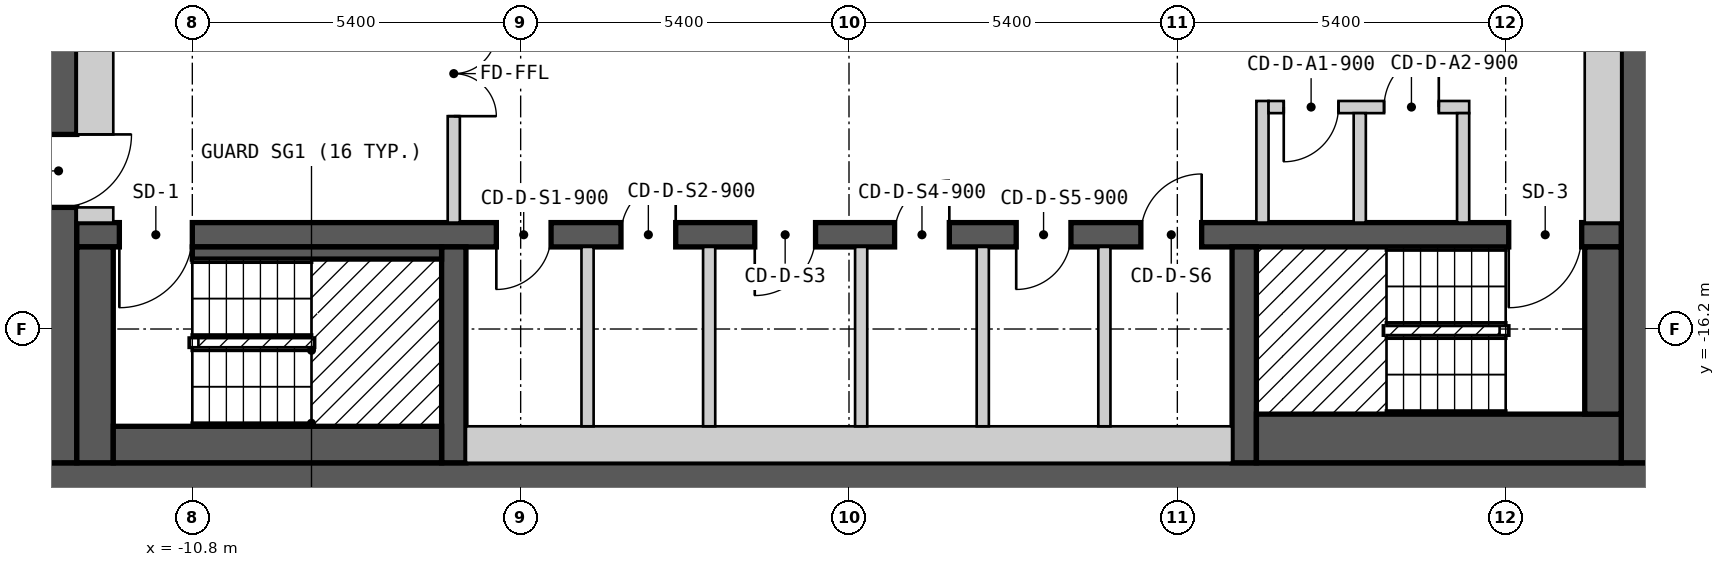
"""IFC4 building model, lengths in metres.
Left out: names, types, materials, properties, quantities, classifications, styles, units other than length and angle.
Written with IfcOpenShell. Run it as: python <this file> out.ifc"""

import sys

from ifc_helpers import new_model, si_unit, direction, frame, frame_2d, origin, place, context, subcontext, project, spatial, rectangle, extrude, element, fill, save


model = new_model("IFC4")
c1 = context("Model", 3, precision=1e-05, world=origin(), true_north=direction((0.0, 1.0)))
c2 = subcontext(c1, "Body", "Model", "MODEL_VIEW")
j1 = project(units=[si_unit("LENGTHUNIT", "METRE"), si_unit("PLANEANGLEUNIT", "RADIAN")], contexts=[c1])
p1 = place(None, origin())
s1 = spatial("IfcSite", under=j1, at=p1, CompositionType="ELEMENT")
p2 = place(p1, origin())
s2 = spatial("IfcBuilding", under=s1, at=p2, CompositionType="ELEMENT")
p3 = place(p2, frame((0.0, 0.0, 169.2)))
s3 = spatial("IfcBuildingStorey", under=s2, at=p3, CompositionType="ELEMENT", Elevation=169.2)
p4 = place(p3, frame((-13.3, -18.7, 0.0), z_axis=(0.0, 0.0, 1.0), x_axis=(1.0, 0.0, 0.0)))
e1 = element("IfcWall", 1, at=p4, inside=s3, PredefinedType="SHEAR", context=c2, shape_type="SweptSolid", body=[
    extrude(rectangle(XDim=26.6, YDim=0.6, at=frame_2d((13.3, 0.0))), origin(), (0.0, 0.0, 1.0), 2.7),
])
p5 = place(p3, frame((-13.0, -18.4, 0.0), z_axis=(0.0, 0.0, 1.0), x_axis=(0.0, 1.0, 0.0)))
e2 = element("IfcWall", 2, at=p5, inside=s3, PredefinedType="SHEAR", context=c2, shape_type="SweptSolid", body=[
    extrude(rectangle(XDim=12.8, YDim=0.6, at=frame_2d((6.4, 0.0))), origin(), (0.0, 0.0, 1.0), 2.7),
])
p6 = place(p5, frame((4.2, 0.0, 0.0)))
e3 = element("IfcOpeningElement", 3, at=p6, cuts=e2, PredefinedType="OPENING", context=c2, shape_type="SweptSolid", body=[
    extrude(rectangle(XDim=1.2, YDim=2.1, at=frame_2d((0.6, 1.05))), frame((0.0, 0.31, 0.0), z_axis=(0.0, -1.0, 0.0), x_axis=(1.0, 0.0, 0.0)), (0.0, 0.0, 1.0), 0.62),
])
p7 = place(p3, frame((13.0, -18.4, 0.0), z_axis=(0.0, 0.0, 1.0), x_axis=(0.0, 1.0, 0.0)))
e4 = element("IfcWall", 4, at=p7, inside=s3, PredefinedType="SHEAR", context=c2, shape_type="SweptSolid", body=[
    extrude(rectangle(XDim=12.8, YDim=0.6, at=frame_2d((6.4, 0.0))), origin(), (0.0, 0.0, 1.0), 2.7),
])
p8 = place(p3, frame((-12.7, -14.65, 0.0), z_axis=(0.0, 0.0, 1.0), x_axis=(1.0, 0.0, 0.0)))
e5 = element("IfcWall", 5, at=p8, inside=s3, PredefinedType="SHEAR", context=c2, shape_type="SweptSolid", body=[
    extrude(rectangle(XDim=25.4, YDim=0.4, at=frame_2d((12.7, 0.0))), origin(), (0.0, 0.0, 1.0), 2.7),
])
p9 = place(p8, frame((1.9, 0.0, 0.0), z_axis=(0.0, 0.0, 1.0), x_axis=(-1.0, 0.0, 0.0)))
e6 = element("IfcOpeningElement", 6, at=p9, cuts=e5, PredefinedType="OPENING", context=c2, shape_type="SweptSolid", body=[
    extrude(rectangle(XDim=1.2, YDim=2.1, at=frame_2d((0.6, 1.05))), frame((0.0, 0.21, 0.0), z_axis=(0.0, -1.0, 0.0), x_axis=(1.0, 0.0, 0.0)), (0.0, 0.0, 1.0), 0.42),
])
p10 = place(p8, frame((24.75, 0.0, 0.0), z_axis=(0.0, 0.0, 1.0), x_axis=(-1.0, 0.0, 0.0)))
e7 = element("IfcOpeningElement", 7, at=p10, cuts=e5, PredefinedType="OPENING", context=c2, shape_type="SweptSolid", body=[
    extrude(rectangle(XDim=1.2, YDim=2.1, at=frame_2d((0.6, 1.05))), frame((0.0, 0.21, 0.0), z_axis=(0.0, -1.0, 0.0), x_axis=(1.0, 0.0, 0.0)), (0.0, 0.0, 1.0), 0.42),
])
p11 = place(p8, frame((7.8, 0.0, 0.0), z_axis=(0.0, 0.0, 1.0), x_axis=(-1.0, 0.0, 0.0)))
e8 = element("IfcOpeningElement", 8, at=p11, cuts=e5, PredefinedType="OPENING", context=c2, shape_type="SweptSolid", body=[
    extrude(rectangle(XDim=0.9, YDim=2.1, at=frame_2d((0.45, 1.05))), frame((0.0, 0.21, 0.0), z_axis=(0.0, -1.0, 0.0), x_axis=(1.0, 0.0, 0.0)), (0.0, 0.0, 1.0), 0.42),
])
p12 = place(p8, frame((9.85, 0.0, 0.0), z_axis=(0.0, 0.0, 1.0), x_axis=(-1.0, 0.0, 0.0)))
e9 = element("IfcOpeningElement", 9, at=p12, cuts=e5, PredefinedType="OPENING", context=c2, shape_type="SweptSolid", body=[
    extrude(rectangle(XDim=0.9, YDim=2.1, at=frame_2d((0.45, 1.05))), frame((0.0, 0.21, 0.0), z_axis=(0.0, -1.0, 0.0), x_axis=(1.0, 0.0, 0.0)), (0.0, 0.0, 1.0), 0.42),
])
p13 = place(p8, frame((12.15, 0.0, 0.0), z_axis=(0.0, 0.0, 1.0), x_axis=(-1.0, 0.0, 0.0)))
e10 = element("IfcOpeningElement", 10, at=p13, cuts=e5, PredefinedType="OPENING", context=c2, shape_type="SweptSolid", body=[
    extrude(rectangle(XDim=1.0, YDim=2.1, at=frame_2d((0.5, 1.05))), frame((0.0, 0.21, 0.0), z_axis=(0.0, -1.0, 0.0), x_axis=(1.0, 0.0, 0.0)), (0.0, 0.0, 1.0), 0.42),
])
p14 = place(p8, frame((14.35, 0.0, 0.0), z_axis=(0.0, 0.0, 1.0), x_axis=(-1.0, 0.0, 0.0)))
e11 = element("IfcOpeningElement", 11, at=p14, cuts=e5, PredefinedType="OPENING", context=c2, shape_type="SweptSolid", body=[
    extrude(rectangle(XDim=0.9, YDim=2.1, at=frame_2d((0.45, 1.05))), frame((0.0, 0.21, 0.0), z_axis=(0.0, -1.0, 0.0), x_axis=(1.0, 0.0, 0.0)), (0.0, 0.0, 1.0), 0.42),
])
p15 = place(p8, frame((16.35, 0.0, 0.0), z_axis=(0.0, 0.0, 1.0), x_axis=(-1.0, 0.0, 0.0)))
e12 = element("IfcOpeningElement", 12, at=p15, cuts=e5, PredefinedType="OPENING", context=c2, shape_type="SweptSolid", body=[
    extrude(rectangle(XDim=0.9, YDim=2.1, at=frame_2d((0.45, 1.05))), frame((0.0, 0.21, 0.0), z_axis=(0.0, -1.0, 0.0), x_axis=(1.0, 0.0, 0.0)), (0.0, 0.0, 1.0), 0.42),
])
p16 = place(p8, frame((18.5, 0.0, 0.0), z_axis=(0.0, 0.0, 1.0), x_axis=(-1.0, 0.0, 0.0)))
e13 = element("IfcOpeningElement", 13, at=p16, cuts=e5, PredefinedType="OPENING", context=c2, shape_type="SweptSolid", body=[
    extrude(rectangle(XDim=1.0, YDim=2.1, at=frame_2d((0.5, 1.05))), frame((0.0, 0.21, 0.0), z_axis=(0.0, -1.0, 0.0), x_axis=(1.0, 0.0, 0.0)), (0.0, 0.0, 1.0), 0.42),
])
for number, where, z_axis, x_axis in (
    (14, (-6.5, -18.4, 0.0), (0.0, 0.0, 1.0), (0.0, 1.0, 0.0)),
    (15, (6.5, -18.4, 0.0), (0.0, 0.0, 1.0), (0.0, 1.0, 0.0)),
):
    element("IfcWall", number, at=place(p3, frame(where, z_axis=z_axis, x_axis=x_axis)), inside=s3, PredefinedType="SHEAR", context=c2, shape_type="SweptSolid", body=[
        extrude(rectangle(XDim=3.55, YDim=0.4, at=frame_2d((1.775, 0.0))), origin(), (0.0, 0.0, 1.0), 2.7),
    ])
p17 = place(p3, frame((-12.4, -18.4, 0.0), z_axis=(0.0, 0.0, 1.0), x_axis=(0.0, 1.0, 0.0)))
e16 = element("IfcWall", 16, at=p17, inside=s3, PredefinedType="SOLIDWALL", context=c2, shape_type="SweptSolid", body=[
    extrude(rectangle(XDim=3.55, YDim=0.6, at=frame_2d((1.775, 0.0))), origin(), (0.0, 0.0, 1.0), 2.7),
])
p18 = place(p3, frame((-12.7, -14.325, 0.0), z_axis=(0.0, 0.0, 1.0), x_axis=(1.0, 0.0, 0.0)))
e17 = element("IfcWall", 17, at=p18, inside=s3, PredefinedType="PARTITIONING", context=c2, shape_type="SweptSolid", body=[
    extrude(rectangle(XDim=0.6, YDim=0.25, at=frame_2d((0.3, 0.0))), origin(), (0.0, 0.0, 1.0), 2.7),
])
p19 = place(p3, frame((-12.4, -13.0, 0.0), z_axis=(0.0, 0.0, 1.0), x_axis=(0.0, 1.0, 0.0)))
e18 = element("IfcWall", 18, at=p19, inside=s3, PredefinedType="PARTITIONING", context=c2, shape_type="SweptSolid", body=[
    extrude(rectangle(XDim=3.45, YDim=0.6, at=frame_2d((1.725, 0.0))), origin(), (0.0, 0.0, 1.0), 2.7),
])
p20 = place(p3, frame((-12.1, -18.1, 0.0), z_axis=(0.0, 0.0, 1.0), x_axis=(1.0, 0.0, 0.0)))
e19 = element("IfcWall", 19, at=p20, inside=s3, PredefinedType="SOLIDWALL", context=c2, shape_type="SweptSolid", body=[
    extrude(rectangle(XDim=5.4, YDim=0.6, at=frame_2d((2.7, 0.0))), origin(), (0.0, 0.0, 1.0), 2.7),
])
p21 = place(p3, frame((-10.8, -14.95, 0.0), z_axis=(0.0, 0.0, 1.0), x_axis=(1.0, 0.0, 0.0)))
e20 = element("IfcWall", 20, at=p21, inside=s3, PredefinedType="SOLIDWALL", context=c2, shape_type="SweptSolid", body=[
    extrude(rectangle(XDim=4.1, YDim=0.2, at=frame_2d((2.05, 0.0))), origin(), (0.0, 0.0, 1.0), 2.7),
])
p22 = place(p3, frame((-6.5, -14.45, 0.0), z_axis=(0.0, 0.0, 1.0), x_axis=(0.0, 1.0, 0.0)))
e21 = element("IfcWall", 21, at=p22, inside=s3, PredefinedType="PARTITIONING", context=c2, shape_type="SweptSolid", body=[
    extrude(rectangle(XDim=4.9, YDim=0.2, at=frame_2d((2.45, 0.0))), origin(), (0.0, 0.0, 1.0), 2.7),
])
p23 = place(p22, frame((3.15, 0.0, 0.0), z_axis=(0.0, 0.0, 1.0), x_axis=(-1.0, 0.0, 0.0)))
e22 = element("IfcOpeningElement", 22, at=p23, cuts=e21, PredefinedType="OPENING", context=c2, shape_type="SweptSolid", body=[
    extrude(rectangle(XDim=1.4, YDim=2.1, at=frame_2d((0.7, 1.05))), frame((0.0, 0.11, 0.0), z_axis=(0.0, -1.0, 0.0), x_axis=(1.0, 0.0, 0.0)), (0.0, 0.0, 1.0), 0.22),
])
p24 = place(p3, frame((-6.3, -18.1, 0.0), z_axis=(0.0, 0.0, 1.0), x_axis=(1.0, 0.0, 0.0)))
e23 = element("IfcWall", 23, at=p24, inside=s3, PredefinedType="PARTITIONING", context=c2, shape_type="SweptSolid", body=[
    extrude(rectangle(XDim=12.6, YDim=0.6, at=frame_2d((6.3, 0.0))), origin(), (0.0, 0.0, 1.0), 2.7),
])
for number, where, z_axis, x_axis in (
    (24, (-4.3, -17.8, 0.0), (0.0, 0.0, 1.0), (0.0, 1.0, 0.0)),
    (25, (-2.3, -17.8, 0.0), (0.0, 0.0, 1.0), (0.0, 1.0, 0.0)),
    (26, (0.2, -17.8, 0.0), (0.0, 0.0, 1.0), (0.0, 1.0, 0.0)),
    (27, (2.2, -17.8, 0.0), (0.0, 0.0, 1.0), (0.0, 1.0, 0.0)),
    (28, (4.2, -17.8, 0.0), (0.0, 0.0, 1.0), (0.0, 1.0, 0.0)),
):
    element("IfcWall", number, at=place(p3, frame(where, z_axis=z_axis, x_axis=x_axis)), inside=s3, PredefinedType="PARTITIONING", context=c2, shape_type="SweptSolid", body=[
        extrude(rectangle(XDim=2.95, YDim=0.2, at=frame_2d((1.475, 0.0))), origin(), (0.0, 0.0, 1.0), 2.7),
    ])
p25 = place(p3, frame((6.7, -18.0, 0.0), z_axis=(0.0, 0.0, 1.0), x_axis=(1.0, 0.0, 0.0)))
e29 = element("IfcWall", 29, at=p25, inside=s3, PredefinedType="SOLIDWALL", context=c2, shape_type="SweptSolid", body=[
    extrude(rectangle(XDim=6.0, YDim=0.8, at=frame_2d((3.0, 0.0))), origin(), (0.0, 0.0, 1.0), 2.7),
])
p26 = place(p3, frame((6.8, -14.45, 0.0), z_axis=(0.0, 0.0, 1.0), x_axis=(0.0, 1.0, 0.0)))
e30 = element("IfcWall", 30, at=p26, inside=s3, PredefinedType="PARTITIONING", context=c2, shape_type="SweptSolid", body=[
    extrude(rectangle(XDim=2.0, YDim=0.2, at=frame_2d((1.0, 0.0))), origin(), (0.0, 0.0, 1.0), 2.7),
])
p27 = place(p3, frame((6.9, -12.55, 0.0), z_axis=(0.0, 0.0, 1.0), x_axis=(1.0, 0.0, 0.0)))
e31 = element("IfcWall", 31, at=p27, inside=s3, PredefinedType="PARTITIONING", context=c2, shape_type="SweptSolid", body=[
    extrude(rectangle(XDim=3.3, YDim=0.2, at=frame_2d((1.65, 0.0))), origin(), (0.0, 0.0, 1.0), 2.7),
])
p28 = place(p27, frame((1.15, 0.0, 0.0), z_axis=(0.0, 0.0, 1.0), x_axis=(-1.0, 0.0, 0.0)))
e32 = element("IfcOpeningElement", 32, at=p28, cuts=e31, PredefinedType="OPENING", context=c2, shape_type="SweptSolid", body=[
    extrude(rectangle(XDim=0.9, YDim=2.1, at=frame_2d((0.45, 1.05))), frame((0.0, 0.11, 0.0), z_axis=(0.0, -1.0, 0.0), x_axis=(1.0, 0.0, 0.0)), (0.0, 0.0, 1.0), 0.22),
])
p29 = place(p27, frame((2.8, 0.0, 0.0), z_axis=(0.0, 0.0, 1.0), x_axis=(-1.0, 0.0, 0.0)))
e33 = element("IfcOpeningElement", 33, at=p29, cuts=e31, PredefinedType="OPENING", context=c2, shape_type="SweptSolid", body=[
    extrude(rectangle(XDim=0.9, YDim=2.1, at=frame_2d((0.45, 1.05))), frame((0.0, 0.11, 0.0), z_axis=(0.0, -1.0, 0.0), x_axis=(1.0, 0.0, 0.0)), (0.0, 0.0, 1.0), 0.22),
])
for number, where, z_axis, x_axis in (
    (34, (8.4, -14.45, 0.0), (0.0, 0.0, 1.0), (0.0, 1.0, 0.0)),
    (35, (10.1, -14.45, 0.0), (0.0, 0.0, 1.0), (0.0, 1.0, 0.0)),
):
    element("IfcWall", number, at=place(p3, frame(where, z_axis=z_axis, x_axis=x_axis)), inside=s3, PredefinedType="PARTITIONING", context=c2, shape_type="SweptSolid", body=[
        extrude(rectangle(XDim=1.8, YDim=0.2, at=frame_2d((0.9, 0.0))), origin(), (0.0, 0.0, 1.0), 2.7),
    ])
p30 = place(p3, frame((12.4, -17.6, 0.0), z_axis=(0.0, 0.0, 1.0), x_axis=(0.0, 1.0, 0.0)))
e36 = element("IfcWall", 36, at=p30, inside=s3, PredefinedType="SOLIDWALL", context=c2, shape_type="SweptSolid", body=[
    extrude(rectangle(XDim=2.75, YDim=0.6, at=frame_2d((1.375, 0.0))), origin(), (0.0, 0.0, 1.0), 2.7),
])
p31 = place(p3, frame((12.4, -14.45, 0.0), z_axis=(0.0, 0.0, 1.0), x_axis=(0.0, 1.0, 0.0)))
e37 = element("IfcWall", 37, at=p31, inside=s3, PredefinedType="PARTITIONING", context=c2, shape_type="SweptSolid", body=[
    extrude(rectangle(XDim=8.25, YDim=0.6, at=frame_2d((4.125, 0.0))), origin(), (0.0, 0.0, 1.0), 2.7),
])
p32 = place(p9, origin())
e38 = element("IfcDoor", 38, at=p32, inside=s3, OperationType="SINGLE_SWING_RIGHT", PredefinedType="DOOR", context=c2, shape_type="SweptSolid", body=[
    extrude(rectangle(XDim=1.2, YDim=2.1, at=frame_2d((0.6, 1.05))), frame((0.0, 0.025, 0.0), z_axis=(0.0, -1.0, 0.0), x_axis=(1.0, 0.0, 0.0)), (0.0, 0.0, 1.0), 0.05),
])
fill(e6, e38)
p33 = place(p10, origin())
e39 = element("IfcDoor", 39, at=p33, inside=s3, OperationType="SINGLE_SWING_RIGHT", PredefinedType="DOOR", context=c2, shape_type="SweptSolid", body=[
    extrude(rectangle(XDim=1.2, YDim=2.1, at=frame_2d((0.6, 1.05))), frame((0.0, 0.025, 0.0), z_axis=(0.0, -1.0, 0.0), x_axis=(1.0, 0.0, 0.0)), (0.0, 0.0, 1.0), 0.05),
])
fill(e7, e39)
p34 = place(p6, origin())
e40 = element("IfcDoor", 40, at=p34, inside=s3, OperationType="SINGLE_SWING_RIGHT", PredefinedType="DOOR", context=c2, shape_type="SweptSolid", body=[
    extrude(rectangle(XDim=1.2, YDim=2.1, at=frame_2d((0.6, 1.05))), frame((0.0, 0.025, 0.0), z_axis=(0.0, -1.0, 0.0), x_axis=(1.0, 0.0, 0.0)), (0.0, 0.0, 1.0), 0.05),
])
fill(e3, e40)
p35 = place(p23, origin())
e41 = element("IfcDoor", 41, at=p35, inside=s3, OperationType="DOUBLE_DOOR_SINGLE_SWING", PredefinedType="DOOR", context=c2, shape_type="SweptSolid", body=[
    extrude(rectangle(XDim=1.4, YDim=2.1, at=frame_2d((0.7, 1.05))), frame((0.0, 0.025, 0.0), z_axis=(0.0, -1.0, 0.0), x_axis=(1.0, 0.0, 0.0)), (0.0, 0.0, 1.0), 0.05),
])
fill(e22, e41)
p36 = place(p28, origin())
e42 = element("IfcDoor", 42, at=p36, inside=s3, OperationType="SINGLE_SWING_RIGHT", PredefinedType="DOOR", context=c2, shape_type="SweptSolid", body=[
    extrude(rectangle(XDim=0.9, YDim=2.1, at=frame_2d((0.45, 1.05))), frame((0.0, 0.025, 0.0), z_axis=(0.0, -1.0, 0.0), x_axis=(1.0, 0.0, 0.0)), (0.0, 0.0, 1.0), 0.05),
])
fill(e32, e42)
p37 = place(p29, origin())
e43 = element("IfcDoor", 43, at=p37, inside=s3, OperationType="SINGLE_SWING_LEFT", PredefinedType="DOOR", context=c2, shape_type="SweptSolid", body=[
    extrude(rectangle(XDim=0.9, YDim=2.1, at=frame_2d((0.45, 1.05))), frame((0.0, 0.025, 0.0), z_axis=(0.0, -1.0, 0.0), x_axis=(1.0, 0.0, 0.0)), (0.0, 0.0, 1.0), 0.05),
])
fill(e33, e43)
p38 = place(p11, origin())
e44 = element("IfcDoor", 44, at=p38, inside=s3, OperationType="SINGLE_SWING_RIGHT", PredefinedType="DOOR", context=c2, shape_type="SweptSolid", body=[
    extrude(rectangle(XDim=0.9, YDim=2.1, at=frame_2d((0.45, 1.05))), frame((0.0, 0.025, 0.0), z_axis=(0.0, -1.0, 0.0), x_axis=(1.0, 0.0, 0.0)), (0.0, 0.0, 1.0), 0.05),
])
fill(e8, e44)
p39 = place(p12, origin())
e45 = element("IfcDoor", 45, at=p39, inside=s3, OperationType="SINGLE_SWING_LEFT", PredefinedType="DOOR", context=c2, shape_type="SweptSolid", body=[
    extrude(rectangle(XDim=0.9, YDim=2.1, at=frame_2d((0.45, 1.05))), frame((0.0, 0.025, 0.0), z_axis=(0.0, -1.0, 0.0), x_axis=(1.0, 0.0, 0.0)), (0.0, 0.0, 1.0), 0.05),
])
fill(e9, e45)
p40 = place(p13, origin())
e46 = element("IfcDoor", 46, at=p40, inside=s3, OperationType="SINGLE_SWING_RIGHT", PredefinedType="DOOR", context=c2, shape_type="SweptSolid", body=[
    extrude(rectangle(XDim=1.0, YDim=2.1, at=frame_2d((0.5, 1.05))), frame((0.0, 0.025, 0.0), z_axis=(0.0, -1.0, 0.0), x_axis=(1.0, 0.0, 0.0)), (0.0, 0.0, 1.0), 0.05),
])
fill(e10, e46)
p41 = place(p14, origin())
e47 = element("IfcDoor", 47, at=p41, inside=s3, OperationType="SINGLE_SWING_LEFT", PredefinedType="DOOR", context=c2, shape_type="SweptSolid", body=[
    extrude(rectangle(XDim=0.9, YDim=2.1, at=frame_2d((0.45, 1.05))), frame((0.0, 0.025, 0.0), z_axis=(0.0, -1.0, 0.0), x_axis=(1.0, 0.0, 0.0)), (0.0, 0.0, 1.0), 0.05),
])
fill(e11, e47)
p42 = place(p15, origin())
e48 = element("IfcDoor", 48, at=p42, inside=s3, OperationType="SINGLE_SWING_RIGHT", PredefinedType="DOOR", context=c2, shape_type="SweptSolid", body=[
    extrude(rectangle(XDim=0.9, YDim=2.1, at=frame_2d((0.45, 1.05))), frame((0.0, 0.025, 0.0), z_axis=(0.0, -1.0, 0.0), x_axis=(1.0, 0.0, 0.0)), (0.0, 0.0, 1.0), 0.05),
])
fill(e12, e48)
p43 = place(p16, origin())
e49 = element("IfcDoor", 49, at=p43, inside=s3, OperationType="SINGLE_SWING_LEFT", PredefinedType="DOOR", context=c2, shape_type="SweptSolid", body=[
    extrude(rectangle(XDim=1.0, YDim=2.1, at=frame_2d((0.5, 1.05))), frame((0.0, 0.025, 0.0), z_axis=(0.0, -1.0, 0.0), x_axis=(1.0, 0.0, 0.0)), (0.0, 0.0, 1.0), 0.05),
])
fill(e13, e49)
save(model, sys.argv[1])
